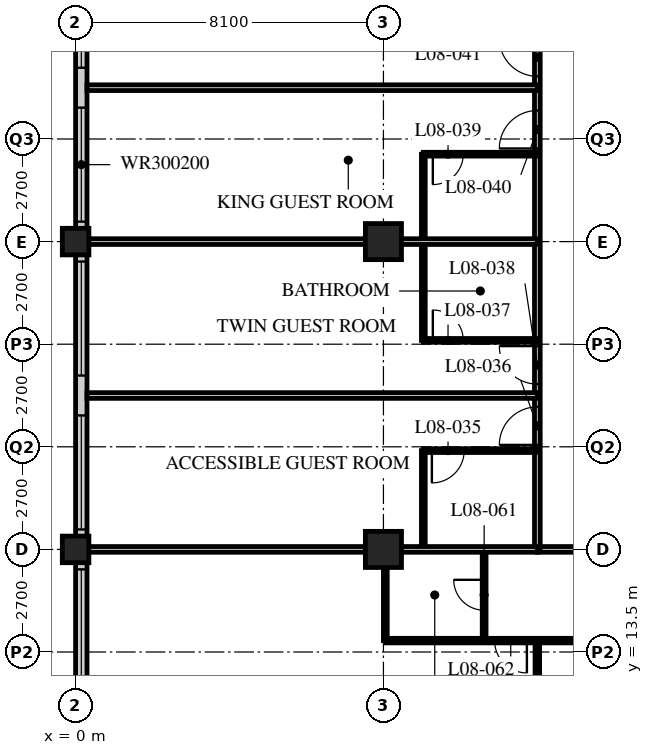
"""IFC4 building model, lengths in metres.
Left out: names, types, materials, properties, quantities, classifications, styles, units other than length and angle.
Written with IfcOpenShell. Run it as: python <this file> out.ifc"""

import sys

from ifc_helpers import new_model, si_unit, direction, frame, frame_2d, origin, origin_2d, place, context, subcontext, project, spatial, rectangle, hollow_rectangle, extrude, element, fill, save


model = new_model("IFC4")
c1 = context("Model", 3, precision=1e-05, world=origin(), true_north=direction((0.0, 1.0)))
c2 = subcontext(c1, "Body", "Model", "MODEL_VIEW")
j1 = project(units=[si_unit("LENGTHUNIT", "METRE"), si_unit("PLANEANGLEUNIT", "RADIAN")], contexts=[c1])
p1 = place(None, origin())
s1 = spatial("IfcSite", under=j1, at=p1, CompositionType="ELEMENT")
p2 = place(p1, origin())
s2 = spatial("IfcBuilding", under=s1, at=p2, CompositionType="ELEMENT")
p3 = place(p2, frame((0.0, 0.0, 39.8)))
s3 = spatial("IfcBuildingStorey", under=s2, at=p3, CompositionType="ELEMENT", Elevation=39.8)
for number, where, z_axis, x_axis in (
    (1, (0.0, 16.2, 0.0), (0.0, 0.0, 1.0), (1.0, 0.0, 0.0)),
    (2, (0.0, 24.3, 0.0), (0.0, 0.0, 1.0), (1.0, 0.0, 0.0)),
):
    element("IfcColumn", number, at=place(p3, frame(where, z_axis=z_axis, x_axis=x_axis)), inside=s3, PredefinedType="COLUMN", context=c2, shape_type="SweptSolid", body=[
        extrude(hollow_rectangle(XDim=0.7, YDim=0.7, WallThickness=0.06, at=origin_2d()), origin(), (0.0, 0.0, 1.0), 3.4),
    ])
for number, where, z_axis, x_axis in (
    (3, (8.1, 16.2, 0.0), (0.0, 0.0, 1.0), (1.0, 0.0, 0.0)),
    (4, (8.1, 24.3, 0.0), (0.0, 0.0, 1.0), (1.0, 0.0, 0.0)),
):
    element("IfcColumn", number, at=place(p3, frame(where, z_axis=z_axis, x_axis=x_axis)), inside=s3, PredefinedType="COLUMN", context=c2, shape_type="SweptSolid", body=[
        extrude(hollow_rectangle(XDim=0.95, YDim=0.95, WallThickness=0.095, at=origin_2d()), origin(), (0.0, 0.0, 1.0), 3.4),
    ])
p4 = place(p3, frame((0.15, 40.2, 0.0), z_axis=(0.0, 0.0, 1.0), x_axis=(0.0, -1.0, 0.0)))
e5 = element("IfcWall", 5, at=p4, inside=s3, PredefinedType="SOLIDWALL", context=c2, shape_type="SweptSolid", body=[
    extrude(rectangle(XDim=32.1, YDim=0.3, at=frame_2d((16.05, 0.0))), origin(), (0.0, 0.0, 1.0), 3.19),
])
p5 = place(p4, frame((0.225, 0.0, 0.9)))
e6 = element("IfcOpeningElement", 6, at=p5, cuts=e5, PredefinedType="OPENING", context=c2, shape_type="SweptSolid", body=[
    extrude(rectangle(XDim=3.0, YDim=2.0, at=frame_2d((1.5, 1.0))), frame((0.0, 0.16, 0.0), z_axis=(0.0, -1.0, 0.0), x_axis=(1.0, 0.0, 0.0)), (0.0, 0.0, 1.0), 0.32),
])
p6 = place(p4, frame((4.275, 0.0, 0.9)))
e7 = element("IfcOpeningElement", 7, at=p6, cuts=e5, PredefinedType="OPENING", context=c2, shape_type="SweptSolid", body=[
    extrude(rectangle(XDim=3.0, YDim=2.0, at=frame_2d((1.5, 1.0))), frame((0.0, 0.16, 0.0), z_axis=(0.0, -1.0, 0.0), x_axis=(1.0, 0.0, 0.0)), (0.0, 0.0, 1.0), 0.32),
])
p7 = place(p4, frame((8.325, 0.0, 0.9)))
e8 = element("IfcOpeningElement", 8, at=p7, cuts=e5, PredefinedType="OPENING", context=c2, shape_type="SweptSolid", body=[
    extrude(rectangle(XDim=3.0, YDim=2.0, at=frame_2d((1.5, 1.0))), frame((0.0, 0.16, 0.0), z_axis=(0.0, -1.0, 0.0), x_axis=(1.0, 0.0, 0.0)), (0.0, 0.0, 1.0), 0.32),
])
p8 = place(p4, frame((12.375, 0.0, 0.9)))
e9 = element("IfcOpeningElement", 9, at=p8, cuts=e5, PredefinedType="OPENING", context=c2, shape_type="SweptSolid", body=[
    extrude(rectangle(XDim=3.0, YDim=2.0, at=frame_2d((1.5, 1.0))), frame((0.0, 0.16, 0.0), z_axis=(0.0, -1.0, 0.0), x_axis=(1.0, 0.0, 0.0)), (0.0, 0.0, 1.0), 0.32),
])
p9 = place(p4, frame((16.425, 0.0, 0.9)))
e10 = element("IfcOpeningElement", 10, at=p9, cuts=e5, PredefinedType="OPENING", context=c2, shape_type="SweptSolid", body=[
    extrude(rectangle(XDim=3.0, YDim=2.0, at=frame_2d((1.5, 1.0))), frame((0.0, 0.16, 0.0), z_axis=(0.0, -1.0, 0.0), x_axis=(1.0, 0.0, 0.0)), (0.0, 0.0, 1.0), 0.32),
])
p10 = place(p4, frame((20.475, 0.0, 0.9)))
e11 = element("IfcOpeningElement", 11, at=p10, cuts=e5, PredefinedType="OPENING", context=c2, shape_type="SweptSolid", body=[
    extrude(rectangle(XDim=3.0, YDim=2.0, at=frame_2d((1.5, 1.0))), frame((0.0, 0.16, 0.0), z_axis=(0.0, -1.0, 0.0), x_axis=(1.0, 0.0, 0.0)), (0.0, 0.0, 1.0), 0.32),
])
p11 = place(p4, frame((24.525, 0.0, 0.9)))
e12 = element("IfcOpeningElement", 12, at=p11, cuts=e5, PredefinedType="OPENING", context=c2, shape_type="SweptSolid", body=[
    extrude(rectangle(XDim=3.0, YDim=2.0, at=frame_2d((1.5, 1.0))), frame((0.0, 0.16, 0.0), z_axis=(0.0, -1.0, 0.0), x_axis=(1.0, 0.0, 0.0)), (0.0, 0.0, 1.0), 0.32),
])
p12 = place(p4, frame((28.575, 0.0, 0.9)))
e13 = element("IfcOpeningElement", 13, at=p12, cuts=e5, PredefinedType="OPENING", context=c2, shape_type="SweptSolid", body=[
    extrude(rectangle(XDim=3.0, YDim=2.0, at=frame_2d((1.5, 1.0))), frame((0.0, 0.16, 0.0), z_axis=(0.0, -1.0, 0.0), x_axis=(1.0, 0.0, 0.0)), (0.0, 0.0, 1.0), 0.32),
])
p13 = place(p3, frame((12.15, 16.2, 0.0), z_axis=(0.0, 0.0, 1.0), x_axis=(1.0, 0.0, 0.0)))
e14 = element("IfcWall", 14, at=p13, inside=s3, PredefinedType="PARTITIONING", context=c2, shape_type="SweptSolid", body=[
    extrude(rectangle(XDim=32.4, YDim=0.15, at=frame_2d((16.2, 0.0))), origin(), (0.0, 0.0, 1.0), 2.578),
])
p14 = place(p13, frame((6.5, 0.0, 0.0)))
e15 = element("IfcOpeningElement", 15, at=p14, cuts=e14, PredefinedType="OPENING", context=c2, shape_type="SweptSolid", body=[
    extrude(rectangle(XDim=1.0, YDim=2.1, at=frame_2d((0.5, 1.05))), frame((0.0, 0.085, 0.0), z_axis=(0.0, -1.0, 0.0), x_axis=(1.0, 0.0, 0.0)), (0.0, 0.0, 1.0), 0.17),
])
p15 = place(p13, frame((8.4, 0.0, 0.0)))
e16 = element("IfcOpeningElement", 16, at=p15, cuts=e14, PredefinedType="OPENING", context=c2, shape_type="SweptSolid", body=[
    extrude(rectangle(XDim=1.0, YDim=2.1, at=frame_2d((0.5, 1.05))), frame((0.0, 0.085, 0.0), z_axis=(0.0, -1.0, 0.0), x_axis=(1.0, 0.0, 0.0)), (0.0, 0.0, 1.0), 0.17),
])
p16 = place(p13, frame((14.6, 0.0, 0.0)))
e17 = element("IfcOpeningElement", 17, at=p16, cuts=e14, PredefinedType="OPENING", context=c2, shape_type="SweptSolid", body=[
    extrude(rectangle(XDim=1.0, YDim=2.1, at=frame_2d((0.5, 1.05))), frame((0.0, 0.085, 0.0), z_axis=(0.0, -1.0, 0.0), x_axis=(1.0, 0.0, 0.0)), (0.0, 0.0, 1.0), 0.17),
])
p17 = place(p13, frame((16.5, 0.0, 0.0)))
e18 = element("IfcOpeningElement", 18, at=p17, cuts=e14, PredefinedType="OPENING", context=c2, shape_type="SweptSolid", body=[
    extrude(rectangle(XDim=1.0, YDim=2.1, at=frame_2d((0.5, 1.05))), frame((0.0, 0.085, 0.0), z_axis=(0.0, -1.0, 0.0), x_axis=(1.0, 0.0, 0.0)), (0.0, 0.0, 1.0), 0.17),
])
p18 = place(p13, frame((23.0, 0.0, 0.0)))
e19 = element("IfcOpeningElement", 19, at=p18, cuts=e14, PredefinedType="OPENING", context=c2, shape_type="SweptSolid", body=[
    extrude(rectangle(XDim=1.0, YDim=2.1, at=frame_2d((0.5, 1.05))), frame((0.0, 0.085, 0.0), z_axis=(0.0, -1.0, 0.0), x_axis=(1.0, 0.0, 0.0)), (0.0, 0.0, 1.0), 0.17),
])
p19 = place(p13, frame((24.6, 0.0, 0.0)))
e20 = element("IfcOpeningElement", 20, at=p19, cuts=e14, PredefinedType="OPENING", context=c2, shape_type="SweptSolid", body=[
    extrude(rectangle(XDim=1.0, YDim=2.1, at=frame_2d((0.5, 1.05))), frame((0.0, 0.085, 0.0), z_axis=(0.0, -1.0, 0.0), x_axis=(1.0, 0.0, 0.0)), (0.0, 0.0, 1.0), 0.17),
])
p20 = place(p13, frame((1.525, 0.0, 0.0)))
e21 = element("IfcOpeningElement", 21, at=p20, cuts=e14, PredefinedType="OPENING", context=c2, shape_type="SweptSolid", body=[
    extrude(rectangle(XDim=1.0, YDim=2.1, at=frame_2d((0.5, 1.05))), frame((0.0, 0.085, 0.0), z_axis=(0.0, -1.0, 0.0), x_axis=(1.0, 0.0, 0.0)), (0.0, 0.0, 1.0), 0.17),
])
p21 = place(p13, frame((29.875, 0.0, 0.0)))
e22 = element("IfcOpeningElement", 22, at=p21, cuts=e14, PredefinedType="OPENING", context=c2, shape_type="SweptSolid", body=[
    extrude(rectangle(XDim=1.0, YDim=2.1, at=frame_2d((0.5, 1.05))), frame((0.0, 0.085, 0.0), z_axis=(0.0, -1.0, 0.0), x_axis=(1.0, 0.0, 0.0)), (0.0, 0.0, 1.0), 0.17),
])
p22 = place(p3, frame((12.15, 16.2, 0.0), z_axis=(0.0, 0.0, 1.0), x_axis=(0.0, 1.0, 0.0)))
e23 = element("IfcWall", 23, at=p22, inside=s3, PredefinedType="PARTITIONING", context=c2, shape_type="SweptSolid", body=[
    extrude(rectangle(XDim=26.1, YDim=0.15, at=frame_2d((13.05, 0.0))), origin(), (0.0, 0.0, 1.0), 3.19),
])
p23 = place(p22, frame((2.75, 0.0, 0.0)))
e24 = element("IfcOpeningElement", 24, at=p23, cuts=e23, PredefinedType="OPENING", context=c2, shape_type="SweptSolid", body=[
    extrude(rectangle(XDim=1.0, YDim=2.1, at=frame_2d((0.5, 1.05))), frame((0.0, 0.085, 0.0), z_axis=(0.0, -1.0, 0.0), x_axis=(1.0, 0.0, 0.0)), (0.0, 0.0, 1.0), 0.17),
])
p24 = place(p22, frame((4.35, 0.0, 0.0)))
e25 = element("IfcOpeningElement", 25, at=p24, cuts=e23, PredefinedType="OPENING", context=c2, shape_type="SweptSolid", body=[
    extrude(rectangle(XDim=1.0, YDim=2.1, at=frame_2d((0.5, 1.05))), frame((0.0, 0.085, 0.0), z_axis=(0.0, -1.0, 0.0), x_axis=(1.0, 0.0, 0.0)), (0.0, 0.0, 1.0), 0.17),
])
p25 = place(p22, frame((10.55, 0.0, 0.0)))
e26 = element("IfcOpeningElement", 26, at=p25, cuts=e23, PredefinedType="OPENING", context=c2, shape_type="SweptSolid", body=[
    extrude(rectangle(XDim=1.0, YDim=2.1, at=frame_2d((0.5, 1.05))), frame((0.0, 0.085, 0.0), z_axis=(0.0, -1.0, 0.0), x_axis=(1.0, 0.0, 0.0)), (0.0, 0.0, 1.0), 0.17),
])
p26 = place(p22, frame((12.45, 0.0, 0.0)))
e27 = element("IfcOpeningElement", 27, at=p26, cuts=e23, PredefinedType="OPENING", context=c2, shape_type="SweptSolid", body=[
    extrude(rectangle(XDim=1.0, YDim=2.1, at=frame_2d((0.5, 1.05))), frame((0.0, 0.085, 0.0), z_axis=(0.0, -1.0, 0.0), x_axis=(1.0, 0.0, 0.0)), (0.0, 0.0, 1.0), 0.17),
])
p27 = place(p22, frame((18.65, 0.0, 0.0)))
e28 = element("IfcOpeningElement", 28, at=p27, cuts=e23, PredefinedType="OPENING", context=c2, shape_type="SweptSolid", body=[
    extrude(rectangle(XDim=1.0, YDim=2.1, at=frame_2d((0.5, 1.05))), frame((0.0, 0.085, 0.0), z_axis=(0.0, -1.0, 0.0), x_axis=(1.0, 0.0, 0.0)), (0.0, 0.0, 1.0), 0.17),
])
p28 = place(p22, frame((22.65, 0.0, 0.0)))
e29 = element("IfcOpeningElement", 29, at=p28, cuts=e23, PredefinedType="OPENING", context=c2, shape_type="SweptSolid", body=[
    extrude(rectangle(XDim=1.0, YDim=2.1, at=frame_2d((0.5, 1.05))), frame((0.0, 0.085, 0.0), z_axis=(0.0, -1.0, 0.0), x_axis=(1.0, 0.0, 0.0)), (0.0, 0.0, 1.0), 0.17),
])
p29 = place(p3, frame((9.15, 16.2, 0.0), z_axis=(0.0, 0.0, 1.0), x_axis=(0.0, 1.0, 0.0)))
e30 = element("IfcWall", 30, at=p29, inside=s3, PredefinedType="PARTITIONING", context=c2, shape_type="SweptSolid", body=[
    extrude(rectangle(XDim=2.6, YDim=0.1, at=frame_2d((1.3, 0.0))), origin(), (0.0, 0.0, 1.0), 3.19),
])
p30 = place(p3, frame((12.15, 18.8, 0.0), z_axis=(0.0, 0.0, 1.0), x_axis=(-1.0, 0.0, 0.0)))
e31 = element("IfcWall", 31, at=p30, inside=s3, PredefinedType="PARTITIONING", context=c2, shape_type="SweptSolid", body=[
    extrude(rectangle(XDim=3.0, YDim=0.1, at=frame_2d((1.5, 0.0))), origin(), (0.0, 0.0, 1.0), 3.19),
])
p31 = place(p30, frame((1.925, 0.0, 0.0)))
e32 = element("IfcOpeningElement", 32, at=p31, cuts=e31, PredefinedType="OPENING", context=c2, shape_type="SweptSolid", body=[
    extrude(rectangle(XDim=0.85, YDim=2.1, at=frame_2d((0.425, 1.05))), frame((0.0, 0.06, 0.0), z_axis=(0.0, -1.0, 0.0), x_axis=(1.0, 0.0, 0.0)), (0.0, 0.0, 1.0), 0.12),
])
p32 = place(p3, frame((12.15, 20.25, 0.0), z_axis=(0.0, 0.0, 1.0), x_axis=(-1.0, 0.0, 0.0)))
e33 = element("IfcWall", 33, at=p32, inside=s3, PredefinedType="PARTITIONING", context=c2, shape_type="SweptSolid", body=[
    extrude(rectangle(XDim=11.85, YDim=0.15, at=frame_2d((5.925, 0.0))), origin(), (0.0, 0.0, 1.0), 3.19),
])
p33 = place(p3, frame((9.15, 21.7, 0.0), z_axis=(0.0, 0.0, 1.0), x_axis=(0.0, 1.0, 0.0)))
e34 = element("IfcWall", 34, at=p33, inside=s3, PredefinedType="PARTITIONING", context=c2, shape_type="SweptSolid", body=[
    extrude(rectangle(XDim=4.9, YDim=0.1, at=frame_2d((2.45, 0.0))), origin(), (0.0, 0.0, 1.0), 3.19),
])
p34 = place(p3, frame((12.15, 21.7, 0.0), z_axis=(0.0, 0.0, 1.0), x_axis=(-1.0, 0.0, 0.0)))
e35 = element("IfcWall", 35, at=p34, inside=s3, PredefinedType="PARTITIONING", context=c2, shape_type="SweptSolid", body=[
    extrude(rectangle(XDim=3.0, YDim=0.1, at=frame_2d((1.5, 0.0))), origin(), (0.0, 0.0, 1.0), 3.19),
])
p35 = place(p34, frame((1.95, 0.0, 0.0)))
e36 = element("IfcOpeningElement", 36, at=p35, cuts=e35, PredefinedType="OPENING", context=c2, shape_type="SweptSolid", body=[
    extrude(rectangle(XDim=0.8, YDim=2.1, at=frame_2d((0.4, 1.05))), frame((0.0, 0.06, 0.0), z_axis=(0.0, -1.0, 0.0), x_axis=(1.0, 0.0, 0.0)), (0.0, 0.0, 1.0), 0.12),
])
p36 = place(p3, frame((12.15, 24.3, 0.0), z_axis=(0.0, 0.0, 1.0), x_axis=(-1.0, 0.0, 0.0)))
e37 = element("IfcWall", 37, at=p36, inside=s3, PredefinedType="PARTITIONING", context=c2, shape_type="SweptSolid", body=[
    extrude(rectangle(XDim=11.85, YDim=0.15, at=frame_2d((5.925, 0.0))), origin(), (0.0, 0.0, 1.0), 2.578),
])
p37 = place(p3, frame((12.15, 26.6, 0.0), z_axis=(0.0, 0.0, 1.0), x_axis=(-1.0, 0.0, 0.0)))
e38 = element("IfcWall", 38, at=p37, inside=s3, PredefinedType="PARTITIONING", context=c2, shape_type="SweptSolid", body=[
    extrude(rectangle(XDim=3.0, YDim=0.1, at=frame_2d((1.5, 0.0))), origin(), (0.0, 0.0, 1.0), 3.19),
])
p38 = place(p37, frame((1.95, 0.0, 0.0)))
e39 = element("IfcOpeningElement", 39, at=p38, cuts=e38, PredefinedType="OPENING", context=c2, shape_type="SweptSolid", body=[
    extrude(rectangle(XDim=0.8, YDim=2.1, at=frame_2d((0.4, 1.05))), frame((0.0, 0.06, 0.0), z_axis=(0.0, -1.0, 0.0), x_axis=(1.0, 0.0, 0.0)), (0.0, 0.0, 1.0), 0.12),
])
p39 = place(p3, frame((12.15, 28.35, 0.0), z_axis=(0.0, 0.0, 1.0), x_axis=(-1.0, 0.0, 0.0)))
e40 = element("IfcWall", 40, at=p39, inside=s3, PredefinedType="PARTITIONING", context=c2, shape_type="SweptSolid", body=[
    extrude(rectangle(XDim=11.85, YDim=0.15, at=frame_2d((5.925, 0.0))), origin(), (0.0, 0.0, 1.0), 3.19),
])
p40 = place(p3, frame((10.75, 16.2, 0.0), z_axis=(0.0, 0.0, 1.0), x_axis=(0.0, -1.0, 0.0)))
e41 = element("IfcWall", 41, at=p40, inside=s3, PredefinedType="PARTITIONING", context=c2, shape_type="SweptSolid", body=[
    extrude(rectangle(XDim=2.4, YDim=0.1, at=frame_2d((1.2, 0.0))), origin(), (0.0, 0.0, 1.0), 3.19),
])
p41 = place(p40, frame((0.8, 0.0, 0.0)))
e42 = element("IfcOpeningElement", 42, at=p41, cuts=e41, PredefinedType="OPENING", context=c2, shape_type="SweptSolid", body=[
    extrude(rectangle(XDim=0.8, YDim=2.1, at=frame_2d((0.4, 1.05))), frame((0.0, 0.06, 0.0), z_axis=(0.0, -1.0, 0.0), x_axis=(1.0, 0.0, 0.0)), (0.0, 0.0, 1.0), 0.12),
])
p42 = place(p3, frame((8.15, 16.2, 0.0), z_axis=(0.0, 0.0, 1.0), x_axis=(0.0, -1.0, 0.0)))
e43 = element("IfcWall", 43, at=p42, inside=s3, PredefinedType="PARTITIONING", context=c2, shape_type="SweptSolid", body=[
    extrude(rectangle(XDim=2.4, YDim=0.1, at=frame_2d((1.2, 0.0))), origin(), (0.0, 0.0, 1.0), 2.578),
])
p43 = place(p3, frame((8.15, 13.8, 0.0), z_axis=(0.0, 0.0, 1.0), x_axis=(1.0, 0.0, 0.0)))
e44 = element("IfcWall", 44, at=p43, inside=s3, PredefinedType="PARTITIONING", context=c2, shape_type="SweptSolid", body=[
    extrude(rectangle(XDim=8.05, YDim=0.12, at=frame_2d((4.025, 0.0))), origin(), (0.0, 0.0, 1.0), 3.19),
])
p44 = place(p43, frame((6.725, 0.0, 0.0)))
e45 = element("IfcOpeningElement", 45, at=p44, cuts=e44, PredefinedType="OPENING", context=c2, shape_type="SweptSolid", body=[
    extrude(rectangle(XDim=0.85, YDim=2.1, at=frame_2d((0.425, 1.05))), frame((0.0, 0.07, 0.0), z_axis=(0.0, -1.0, 0.0), x_axis=(1.0, 0.0, 0.0)), (0.0, 0.0, 1.0), 0.14),
])
p45 = place(p43, frame((2.875, 0.0, 0.0)))
e46 = element("IfcOpeningElement", 46, at=p45, cuts=e44, PredefinedType="OPENING", context=c2, shape_type="SweptSolid", body=[
    extrude(rectangle(XDim=0.85, YDim=2.1, at=frame_2d((0.425, 1.05))), frame((0.0, 0.07, 0.0), z_axis=(0.0, -1.0, 0.0), x_axis=(1.0, 0.0, 0.0)), (0.0, 0.0, 1.0), 0.14),
])
p46 = place(p3, frame((12.15, 13.8, 0.0), z_axis=(0.0, 0.0, 1.0), x_axis=(0.0, -1.0, 0.0)))
e47 = element("IfcWall", 47, at=p46, inside=s3, PredefinedType="PARTITIONING", context=c2, shape_type="SweptSolid", body=[
    extrude(rectangle(XDim=13.5, YDim=0.12, at=frame_2d((6.75, 0.0))), origin(), (0.0, 0.0, 1.0), 3.19),
])
p47 = place(p3, frame((0.3, 16.2, 0.0), z_axis=(0.0, 0.0, 1.0), x_axis=(1.0, 0.0, 0.0)))
e48 = element("IfcWall", 48, at=p47, inside=s3, PredefinedType="PARTITIONING", context=c2, shape_type="SweptSolid", body=[
    extrude(rectangle(XDim=11.85, YDim=0.15, at=frame_2d((5.925, 0.0))), origin(), (0.0, 0.0, 1.0), 2.578),
])
p48 = place(p7, origin())
e49 = element("IfcWindow", 49, at=p48, inside=s3, PartitioningType="SINGLE_PANEL", PredefinedType="WINDOW", context=c2, shape_type="SweptSolid", body=[
    extrude(rectangle(XDim=3.0, YDim=2.0, at=frame_2d((1.5, 1.0))), frame((0.0, 0.03, 0.0), z_axis=(0.0, -1.0, 0.0), x_axis=(1.0, 0.0, 0.0)), (0.0, 0.0, 1.0), 0.06),
])
fill(e8, e49)
p49 = place(p8, origin())
e50 = element("IfcWindow", 50, at=p49, inside=s3, PartitioningType="SINGLE_PANEL", PredefinedType="WINDOW", context=c2, shape_type="SweptSolid", body=[
    extrude(rectangle(XDim=3.0, YDim=2.0, at=frame_2d((1.5, 1.0))), frame((0.0, 0.03, 0.0), z_axis=(0.0, -1.0, 0.0), x_axis=(1.0, 0.0, 0.0)), (0.0, 0.0, 1.0), 0.06),
])
fill(e9, e50)
p50 = place(p9, origin())
e51 = element("IfcWindow", 51, at=p50, inside=s3, PartitioningType="SINGLE_PANEL", PredefinedType="WINDOW", context=c2, shape_type="SweptSolid", body=[
    extrude(rectangle(XDim=3.0, YDim=2.0, at=frame_2d((1.5, 1.0))), frame((0.0, 0.03, 0.0), z_axis=(0.0, -1.0, 0.0), x_axis=(1.0, 0.0, 0.0)), (0.0, 0.0, 1.0), 0.06),
])
fill(e10, e51)
p51 = place(p10, origin())
e52 = element("IfcWindow", 52, at=p51, inside=s3, PartitioningType="SINGLE_PANEL", PredefinedType="WINDOW", context=c2, shape_type="SweptSolid", body=[
    extrude(rectangle(XDim=3.0, YDim=2.0, at=frame_2d((1.5, 1.0))), frame((0.0, 0.03, 0.0), z_axis=(0.0, -1.0, 0.0), x_axis=(1.0, 0.0, 0.0)), (0.0, 0.0, 1.0), 0.06),
])
fill(e11, e52)
p52 = place(p11, origin())
e53 = element("IfcWindow", 53, at=p52, inside=s3, PartitioningType="SINGLE_PANEL", PredefinedType="WINDOW", context=c2, shape_type="SweptSolid", body=[
    extrude(rectangle(XDim=3.0, YDim=2.0, at=frame_2d((1.5, 1.0))), frame((0.0, 0.03, 0.0), z_axis=(0.0, -1.0, 0.0), x_axis=(1.0, 0.0, 0.0)), (0.0, 0.0, 1.0), 0.06),
])
fill(e12, e53)
p53 = place(p31, origin())
e54 = element("IfcDoor", 54, at=p53, inside=s3, OperationType="SINGLE_SWING_RIGHT", PredefinedType="DOOR", context=c2, shape_type="SweptSolid", body=[
    extrude(rectangle(XDim=0.85, YDim=2.1, at=frame_2d((0.425, 1.05))), frame((0.0, 0.025, 0.0), z_axis=(0.0, -1.0, 0.0), x_axis=(1.0, 0.0, 0.0)), (0.0, 0.0, 1.0), 0.05),
])
fill(e32, e54)
p54 = place(p23, origin())
e55 = element("IfcDoor", 55, at=p54, inside=s3, OperationType="SINGLE_SWING_LEFT", PredefinedType="DOOR", context=c2, shape_type="SweptSolid", body=[
    extrude(rectangle(XDim=1.0, YDim=2.1, at=frame_2d((0.5, 1.05))), frame((0.0, 0.025, 0.0), z_axis=(0.0, -1.0, 0.0), x_axis=(1.0, 0.0, 0.0)), (0.0, 0.0, 1.0), 0.05),
])
fill(e24, e55)
p55 = place(p35, origin())
e56 = element("IfcDoor", 56, at=p55, inside=s3, OperationType="SINGLE_SWING_LEFT", PredefinedType="DOOR", context=c2, shape_type="SweptSolid", body=[
    extrude(rectangle(XDim=0.8, YDim=2.1, at=frame_2d((0.4, 1.05))), frame((0.0, 0.025, 0.0), z_axis=(0.0, -1.0, 0.0), x_axis=(1.0, 0.0, 0.0)), (0.0, 0.0, 1.0), 0.05),
])
fill(e36, e56)
p56 = place(p24, origin())
e57 = element("IfcDoor", 57, at=p56, inside=s3, OperationType="SINGLE_SWING_RIGHT", PredefinedType="DOOR", context=c2, shape_type="SweptSolid", body=[
    extrude(rectangle(XDim=1.0, YDim=2.1, at=frame_2d((0.5, 1.05))), frame((0.0, 0.025, 0.0), z_axis=(0.0, -1.0, 0.0), x_axis=(1.0, 0.0, 0.0)), (0.0, 0.0, 1.0), 0.05),
])
fill(e25, e57)
p57 = place(p38, origin())
e58 = element("IfcDoor", 58, at=p57, inside=s3, OperationType="SINGLE_SWING_RIGHT", PredefinedType="DOOR", context=c2, shape_type="SweptSolid", body=[
    extrude(rectangle(XDim=0.8, YDim=2.1, at=frame_2d((0.4, 1.05))), frame((0.0, 0.025, 0.0), z_axis=(0.0, -1.0, 0.0), x_axis=(1.0, 0.0, 0.0)), (0.0, 0.0, 1.0), 0.05),
])
fill(e39, e58)
p58 = place(p25, origin())
e59 = element("IfcDoor", 59, at=p58, inside=s3, OperationType="SINGLE_SWING_LEFT", PredefinedType="DOOR", context=c2, shape_type="SweptSolid", body=[
    extrude(rectangle(XDim=1.0, YDim=2.1, at=frame_2d((0.5, 1.05))), frame((0.0, 0.025, 0.0), z_axis=(0.0, -1.0, 0.0), x_axis=(1.0, 0.0, 0.0)), (0.0, 0.0, 1.0), 0.05),
])
fill(e26, e59)
p59 = place(p26, origin())
e60 = element("IfcDoor", 60, at=p59, inside=s3, OperationType="SINGLE_SWING_RIGHT", PredefinedType="DOOR", context=c2, shape_type="SweptSolid", body=[
    extrude(rectangle(XDim=1.0, YDim=2.1, at=frame_2d((0.5, 1.05))), frame((0.0, 0.025, 0.0), z_axis=(0.0, -1.0, 0.0), x_axis=(1.0, 0.0, 0.0)), (0.0, 0.0, 1.0), 0.05),
])
fill(e27, e60)
p60 = place(p41, origin())
e61 = element("IfcDoor", 61, at=p60, inside=s3, OperationType="SINGLE_SWING_RIGHT", PredefinedType="DOOR", context=c2, shape_type="SweptSolid", body=[
    extrude(rectangle(XDim=0.8, YDim=2.1, at=frame_2d((0.4, 1.05))), frame((0.0, 0.025, 0.0), z_axis=(0.0, -1.0, 0.0), x_axis=(1.0, 0.0, 0.0)), (0.0, 0.0, 1.0), 0.05),
])
fill(e42, e61)
p61 = place(p45, origin())
e62 = element("IfcDoor", 62, at=p61, inside=s3, OperationType="SINGLE_SWING_LEFT", PredefinedType="DOOR", context=c2, shape_type="SweptSolid", body=[
    extrude(rectangle(XDim=0.85, YDim=2.1, at=frame_2d((0.425, 1.05))), frame((0.0, 0.025, 0.0), z_axis=(0.0, -1.0, 0.0), x_axis=(1.0, 0.0, 0.0)), (0.0, 0.0, 1.0), 0.05),
])
fill(e46, e62)
save(model, sys.argv[1])
